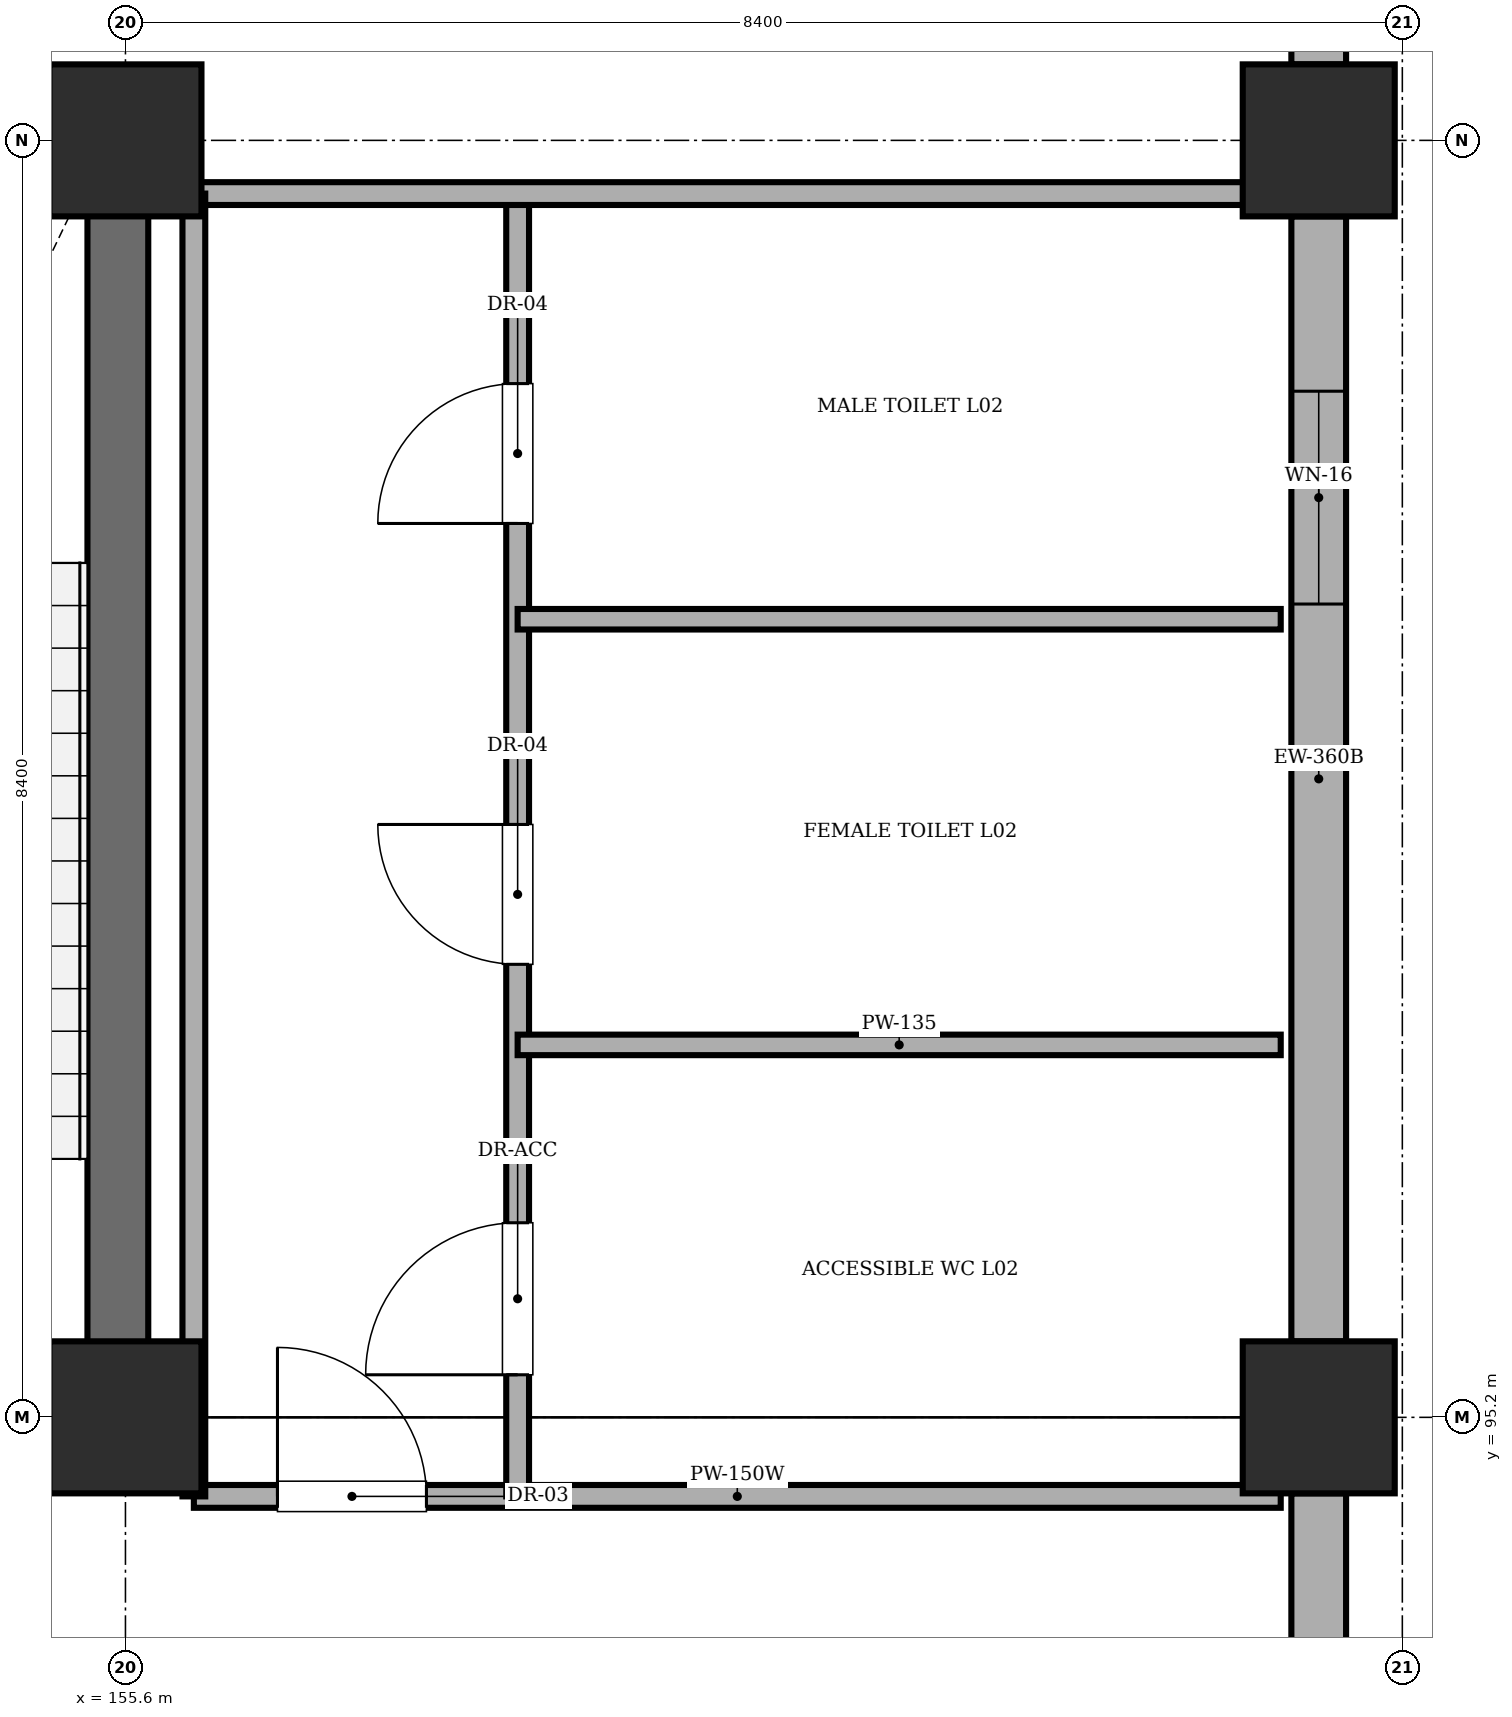
"""IFC4 building model, lengths in metres.
Left out: names, types, materials, properties, quantities, classifications, styles, units other than length and angle.
Written with IfcOpenShell. Run it as: python <this file> out.ifc"""

import sys

from ifc_helpers import new_model, si_unit, direction, frame, frame_2d, origin, origin_2d, place, context, subcontext, project, spatial, rectangle, extrude, element, fill, save


model = new_model("IFC4")
c1 = context("Model", 3, precision=1e-05, world=origin(), true_north=direction((0.0, 1.0)))
c2 = subcontext(c1, "Body", "Model", "MODEL_VIEW")
j1 = project(units=[si_unit("LENGTHUNIT", "METRE"), si_unit("PLANEANGLEUNIT", "RADIAN")], contexts=[c1])
p1 = place(None, origin())
s1 = spatial("IfcSite", under=j1, at=p1, CompositionType="ELEMENT")
p2 = place(p1, origin())
s2 = spatial("IfcBuilding", under=s1, at=p2, CompositionType="ELEMENT")
p3 = place(p2, frame((0.0, 0.0, 5.4)))
s3 = spatial("IfcBuildingStorey", under=s2, at=p3, CompositionType="ELEMENT", Elevation=5.4)
for number, where, z_axis, x_axis in (
    (1, (155.6, 95.2, 0.0), (0.0, 0.0, 1.0), (1.0, 0.0, 0.0)),
    (2, (155.6, 103.6, 0.0), (0.0, 0.0, 1.0), (1.0, 0.0, 0.0)),
    (3, (163.45, 95.2, 0.0), (0.0, 0.0, 1.0), (1.0, 0.0, 0.0)),
    (4, (163.45, 103.6, 0.0), (0.0, 0.0, 1.0), (1.0, 0.0, 0.0)),
):
    element("IfcColumn", number, at=place(p3, frame(where, z_axis=z_axis, x_axis=x_axis)), inside=s3, PredefinedType="COLUMN", context=c2, shape_type="SweptSolid", body=[
        extrude(rectangle(XDim=1.0, YDim=1.0, at=origin_2d()), origin(), (0.0, 0.0, 1.0), 4.58),
    ])
for number, where, z_axis, x_axis in (
    (5, (151.85, 95.25, 0.0), (0.0, 0.0, 1.0), (1.0, 0.0, 0.0)),
    (6, (151.85, 103.55, 0.0), (0.0, 0.0, 1.0), (1.0, 0.0, 0.0)),
):
    element("IfcWall", number, at=place(p3, frame(where, z_axis=z_axis, x_axis=x_axis)), inside=s3, PredefinedType="SHEAR", context=c2, shape_type="SweptSolid", body=[
        extrude(rectangle(XDim=3.9, YDim=0.4, at=frame_2d((1.95, 0.0))), origin(), (0.0, 0.0, 1.0), 4.58),
    ])
p4 = place(p3, frame((155.55, 95.45, 0.0), z_axis=(0.0, 0.0, 1.0), x_axis=(0.0, 1.0, 0.0)))
e7 = element("IfcWall", 7, at=p4, inside=s3, PredefinedType="SHEAR", context=c2, shape_type="SweptSolid", body=[
    extrude(rectangle(XDim=7.9, YDim=0.4, at=frame_2d((3.95, 0.0))), origin(), (0.0, 0.0, 1.0), 4.58),
])
p5 = place(p3, frame((163.45, 94.7, 0.0), z_axis=(0.0, 0.0, 1.0), x_axis=(0.0, -1.0, 0.0)))
e8 = element("IfcWall", 8, at=p5, inside=s3, PredefinedType="STANDARD", context=c2, shape_type="SweptSolid", body=[
    extrude(rectangle(XDim=7.4, YDim=0.36, at=frame_2d((3.7, 0.0))), origin(), (0.0, 0.0, 1.0), 3.83),
])
p6 = place(p5, frame((4.2, 0.0, 1.1)))
e9 = element("IfcOpeningElement", 9, at=p6, cuts=e8, PredefinedType="OPENING", context=c2, shape_type="SweptSolid", body=[
    extrude(rectangle(XDim=1.8, YDim=1.8, at=frame_2d((0.9, 0.9))), frame((0.0, 0.19, 0.0), z_axis=(0.0, -1.0, 0.0), x_axis=(1.0, 0.0, 0.0)), (0.0, 0.0, 1.0), 0.38),
])
p7 = place(p3, frame((163.45, 103.1, 0.0), z_axis=(0.0, 0.0, 1.0), x_axis=(0.0, -1.0, 0.0)))
e10 = element("IfcWall", 10, at=p7, inside=s3, PredefinedType="STANDARD", context=c2, shape_type="SweptSolid", body=[
    extrude(rectangle(XDim=7.4, YDim=0.36, at=frame_2d((3.7, 0.0))), origin(), (0.0, 0.0, 1.0), 3.83),
])
p8 = place(p7, frame((1.15, 0.0, 1.1)))
e11 = element("IfcOpeningElement", 11, at=p8, cuts=e10, PredefinedType="OPENING", context=c2, shape_type="SweptSolid", body=[
    extrude(rectangle(XDim=1.4, YDim=1.4, at=frame_2d((0.7, 0.7))), frame((0.0, 0.19, 0.0), z_axis=(0.0, -1.0, 0.0), x_axis=(1.0, 0.0, 0.0)), (0.0, 0.0, 1.0), 0.38),
])
p9 = place(p3, frame((163.45, 110.95, 0.0), z_axis=(0.0, 0.0, 1.0), x_axis=(0.0, -1.0, 0.0)))
e12 = element("IfcWall", 12, at=p9, inside=s3, PredefinedType="STANDARD", context=c2, shape_type="SweptSolid", body=[
    extrude(rectangle(XDim=6.85, YDim=0.36, at=frame_2d((3.425, 0.0))), origin(), (0.0, 0.0, 1.0), 3.83),
])
p10 = place(p9, frame((1.15, 0.0, 1.1)))
e13 = element("IfcOpeningElement", 13, at=p10, cuts=e12, PredefinedType="OPENING", context=c2, shape_type="SweptSolid", body=[
    extrude(rectangle(XDim=1.8, YDim=1.8, at=frame_2d((0.9, 0.9))), frame((0.0, 0.19, 0.0), z_axis=(0.0, -1.0, 0.0), x_axis=(1.0, 0.0, 0.0)), (0.0, 0.0, 1.0), 0.38),
])
p11 = place(p3, frame((156.05, 94.68, 0.0), z_axis=(0.0, 0.0, 1.0), x_axis=(1.0, 0.0, 0.0)))
e14 = element("IfcWall", 14, at=p11, inside=s3, PredefinedType="PARTITIONING", context=c2, shape_type="SweptSolid", body=[
    extrude(rectangle(XDim=7.15, YDim=0.15, at=frame_2d((3.575, 0.0))), origin(), (0.0, 0.0, 1.0), 4.58),
])
p12 = place(p11, frame((0.55, 0.0, 0.0)))
e15 = element("IfcOpeningElement", 15, at=p12, cuts=e14, PredefinedType="OPENING", context=c2, shape_type="SweptSolid", body=[
    extrude(rectangle(XDim=0.98, YDim=2.12, at=frame_2d((0.49, 1.06))), frame((0.0, 0.085, 0.0), z_axis=(0.0, -1.0, 0.0), x_axis=(1.0, 0.0, 0.0)), (0.0, 0.0, 1.0), 0.17),
])
p13 = place(p3, frame((158.18, 94.68, 0.0), z_axis=(0.0, 0.0, 1.0), x_axis=(0.0, 1.0, 0.0)))
e16 = element("IfcWall", 16, at=p13, inside=s3, PredefinedType="PARTITIONING", context=c2, shape_type="SweptSolid", body=[
    extrude(rectangle(XDim=8.57, YDim=0.15, at=frame_2d((4.285, 0.0))), origin(), (0.0, 0.0, 1.0), 4.58),
])
p14 = place(p13, frame((0.8, 0.0, 0.0)))
e17 = element("IfcOpeningElement", 17, at=p14, cuts=e16, PredefinedType="OPENING", context=c2, shape_type="SweptSolid", body=[
    extrude(rectangle(XDim=1.0, YDim=2.12, at=frame_2d((0.5, 1.06))), frame((0.0, 0.085, 0.0), z_axis=(0.0, -1.0, 0.0), x_axis=(1.0, 0.0, 0.0)), (0.0, 0.0, 1.0), 0.17),
])
p15 = place(p13, frame((3.5, 0.0, 0.0)))
e18 = element("IfcOpeningElement", 18, at=p15, cuts=e16, PredefinedType="OPENING", context=c2, shape_type="SweptSolid", body=[
    extrude(rectangle(XDim=0.92, YDim=2.1, at=frame_2d((0.46, 1.05))), frame((0.0, 0.085, 0.0), z_axis=(0.0, -1.0, 0.0), x_axis=(1.0, 0.0, 0.0)), (0.0, 0.0, 1.0), 0.17),
])
p16 = place(p13, frame((6.4, 0.0, 0.0)))
e19 = element("IfcOpeningElement", 19, at=p16, cuts=e16, PredefinedType="OPENING", context=c2, shape_type="SweptSolid", body=[
    extrude(rectangle(XDim=0.92, YDim=2.1, at=frame_2d((0.46, 1.05))), frame((0.0, 0.085, 0.0), z_axis=(0.0, -1.0, 0.0), x_axis=(1.0, 0.0, 0.0)), (0.0, 0.0, 1.0), 0.17),
])
for number, where, z_axis, x_axis in (
    (20, (158.18, 97.65, 0.0), (0.0, 0.0, 1.0), (1.0, 0.0, 0.0)),
    (21, (158.18, 100.45, 0.0), (0.0, 0.0, 1.0), (1.0, 0.0, 0.0)),
):
    element("IfcWall", number, at=place(p3, frame(where, z_axis=z_axis, x_axis=x_axis)), inside=s3, PredefinedType="PARTITIONING", context=c2, shape_type="SweptSolid", body=[
        extrude(rectangle(XDim=5.02, YDim=0.135, at=frame_2d((2.51, 0.0))), origin(), (0.0, 0.0, 1.0), 4.58),
    ])
p17 = place(p3, frame((156.05, 103.25, 0.0), z_axis=(0.0, 0.0, 1.0), x_axis=(1.0, 0.0, 0.0)))
e22 = element("IfcWall", 22, at=p17, inside=s3, PredefinedType="PARTITIONING", context=c2, shape_type="SweptSolid", body=[
    extrude(rectangle(XDim=7.15, YDim=0.15, at=frame_2d((3.575, 0.0))), origin(), (0.0, 0.0, 1.0), 4.58),
])
p18 = place(p3, frame((156.05, 94.68, 0.0), z_axis=(0.0, 0.0, 1.0), x_axis=(0.0, 1.0, 0.0)))
e23 = element("IfcWall", 23, at=p18, inside=s3, PredefinedType="PARTITIONING", context=c2, shape_type="SweptSolid", body=[
    extrude(rectangle(XDim=8.57, YDim=0.15, at=frame_2d((4.285, 0.0))), origin(), (0.0, 0.0, 1.0), 4.58),
])
p19 = place(p8, origin())
e24 = element("IfcWindow", 24, at=p19, inside=s3, PartitioningType="SINGLE_PANEL", PredefinedType="WINDOW", context=c2, shape_type="SweptSolid", body=[
    extrude(rectangle(XDim=1.4, YDim=1.4, at=frame_2d((0.7, 0.7))), frame((0.0, 0.03, 0.0), z_axis=(0.0, -1.0, 0.0), x_axis=(1.0, 0.0, 0.0)), (0.0, 0.0, 1.0), 0.06),
])
fill(e11, e24)
p20 = place(p12, origin())
e25 = element("IfcDoor", 25, at=p20, inside=s3, OperationType="SINGLE_SWING_LEFT", PredefinedType="DOOR", context=c2, shape_type="SweptSolid", body=[
    extrude(rectangle(XDim=0.98, YDim=2.12, at=frame_2d((0.49, 1.06))), frame((0.0, 0.025, 0.0), z_axis=(0.0, -1.0, 0.0), x_axis=(1.0, 0.0, 0.0)), (0.0, 0.0, 1.0), 0.05),
])
fill(e15, e25)
p21 = place(p14, origin())
e26 = element("IfcDoor", 26, at=p21, inside=s3, OperationType="SINGLE_SWING_LEFT", PredefinedType="DOOR", context=c2, shape_type="SweptSolid", body=[
    extrude(rectangle(XDim=1.0, YDim=2.12, at=frame_2d((0.5, 1.06))), frame((0.0, 0.025, 0.0), z_axis=(0.0, -1.0, 0.0), x_axis=(1.0, 0.0, 0.0)), (0.0, 0.0, 1.0), 0.05),
])
fill(e17, e26)
p22 = place(p15, origin())
e27 = element("IfcDoor", 27, at=p22, inside=s3, OperationType="SINGLE_SWING_RIGHT", PredefinedType="DOOR", context=c2, shape_type="SweptSolid", body=[
    extrude(rectangle(XDim=0.92, YDim=2.1, at=frame_2d((0.46, 1.05))), frame((0.0, 0.025, 0.0), z_axis=(0.0, -1.0, 0.0), x_axis=(1.0, 0.0, 0.0)), (0.0, 0.0, 1.0), 0.05),
])
fill(e18, e27)
p23 = place(p16, origin())
e28 = element("IfcDoor", 28, at=p23, inside=s3, OperationType="SINGLE_SWING_LEFT", PredefinedType="DOOR", context=c2, shape_type="SweptSolid", body=[
    extrude(rectangle(XDim=0.92, YDim=2.1, at=frame_2d((0.46, 1.05))), frame((0.0, 0.025, 0.0), z_axis=(0.0, -1.0, 0.0), x_axis=(1.0, 0.0, 0.0)), (0.0, 0.0, 1.0), 0.05),
])
fill(e19, e28)
save(model, sys.argv[1])
